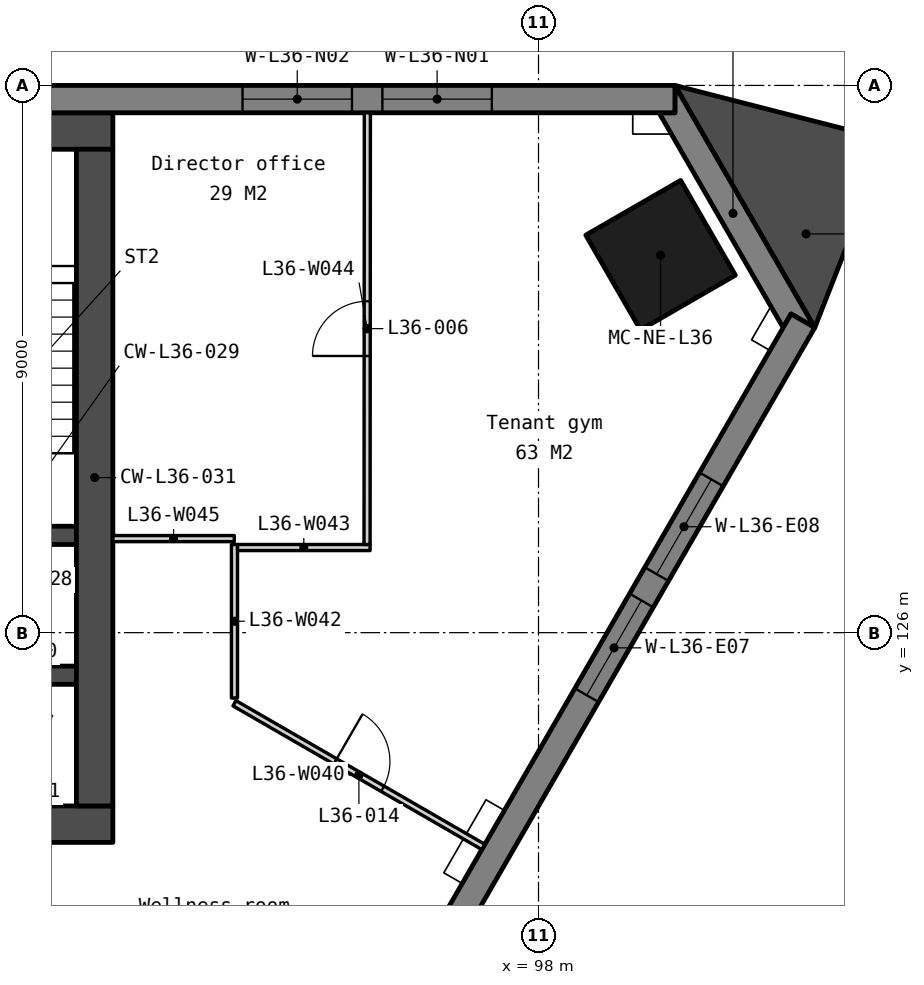
"""IFC4 building model, lengths in metres.
Left out: names, types, materials, properties, quantities, classifications, styles, units other than length and angle.
Written with IfcOpenShell. Run it as: python <this file> out.ifc"""

import sys

from ifc_helpers import new_model, si_unit, direction, frame, frame_2d, origin, origin_2d, place, context, subcontext, project, spatial, polyline, rectangle, outline, extrude, element, fill, save


model = new_model("IFC4")
c1 = context("Model", 3, precision=1e-05, world=origin(), true_north=direction((0.0, 1.0)))
c2 = subcontext(c1, "Body", "Model", "MODEL_VIEW")
j1 = project(units=[si_unit("LENGTHUNIT", "METRE"), si_unit("PLANEANGLEUNIT", "RADIAN")], contexts=[c1])
p1 = place(None, origin())
s1 = spatial("IfcSite", under=j1, at=p1, CompositionType="ELEMENT")
p2 = place(p1, origin())
s2 = spatial("IfcBuilding", under=s1, at=p2, CompositionType="ELEMENT")
p3 = place(p2, frame((0.0, 0.0, 144.2)))
s3 = spatial("IfcBuildingStorey", under=s2, at=p3, CompositionType="ELEMENT", Elevation=144.2)
p4 = place(p3, frame((100.007, 132.208, 0.0), z_axis=(0.0, 0.0, 1.0), x_axis=(-0.5, 0.866025403784, 0.0)))
e1 = element("IfcColumn", 1, at=p4, inside=s3, PredefinedType="COLUMN", context=c2, shape_type="SweptSolid", body=[
    extrude(rectangle(XDim=1.8, YDim=1.8, at=origin_2d()), origin(), (0.0, 0.0, 1.0), 3.9),
])
p5 = place(p3, frame((69.0, 134.25, 0.0), z_axis=(0.0, 0.0, 1.0), x_axis=(1.0, 0.0, 0.0)))
e2 = element("IfcWall", 2, at=p5, inside=s3, PredefinedType="SOLIDWALL", context=c2, shape_type="SweptSolid", body=[
    extrude(rectangle(XDim=22.0, YDim=0.6, at=frame_2d((11.0, 0.0))), origin(), (0.0, 0.0, 1.0), 3.75),
])
p6 = place(p3, frame((69.0, 122.85, 0.0), z_axis=(0.0, 0.0, 1.0), x_axis=(1.0, 0.0, 0.0)))
e3 = element("IfcWall", 3, at=p6, inside=s3, PredefinedType="SOLIDWALL", context=c2, shape_type="SweptSolid", body=[
    extrude(rectangle(XDim=22.0, YDim=0.6, at=frame_2d((11.0, 0.0))), origin(), (0.0, 0.0, 1.0), 3.75),
])
p7 = place(p6, frame((16.375, 0.0, 0.0)))
e4 = element("IfcOpeningElement", 4, at=p7, cuts=e3, PredefinedType="OPENING", context=c2, shape_type="SweptSolid", body=[
    extrude(rectangle(XDim=1.8, YDim=2.1, at=frame_2d((0.9, 1.05))), frame((0.0, 0.31, 0.0), z_axis=(0.0, -1.0, 0.0), x_axis=(1.0, 0.0, 0.0)), (0.0, 0.0, 1.0), 0.62),
])
p8 = place(p6, frame((3.825, 0.0, 0.0)))
e5 = element("IfcOpeningElement", 5, at=p8, cuts=e3, PredefinedType="OPENING", context=c2, shape_type="SweptSolid", body=[
    extrude(rectangle(XDim=1.8, YDim=2.1, at=frame_2d((0.9, 1.05))), frame((0.0, 0.31, 0.0), z_axis=(0.0, -1.0, 0.0), x_axis=(1.0, 0.0, 0.0)), (0.0, 0.0, 1.0), 0.62),
])
p9 = place(p6, frame((12.85, 0.0, 0.0)))
e6 = element("IfcOpeningElement", 6, at=p9, cuts=e3, PredefinedType="OPENING", context=c2, shape_type="SweptSolid", body=[
    extrude(rectangle(XDim=1.5, YDim=2.1, at=frame_2d((0.75, 1.05))), frame((0.0, 0.31, 0.0), z_axis=(0.0, -1.0, 0.0), x_axis=(1.0, 0.0, 0.0)), (0.0, 0.0, 1.0), 0.62),
])
for number, where, z_axis, x_axis in (
    (7, (87.85, 127.6, 0.0), (0.0, 0.0, 1.0), (1.0, 0.0, 0.0)),
    (8, (87.85, 125.3, 0.0), (0.0, 0.0, 1.0), (1.0, 0.0, 0.0)),
):
    element("IfcWall", number, at=place(p3, frame(where, z_axis=z_axis, x_axis=x_axis)), inside=s3, PredefinedType="SOLIDWALL", context=c2, shape_type="SweptSolid", body=[
        extrude(rectangle(XDim=2.55, YDim=0.3, at=frame_2d((1.275, 0.0))), origin(), (0.0, 0.0, 1.0), 3.75),
    ])
p10 = place(p3, frame((90.7, 133.95, 0.0), z_axis=(0.0, 0.0, 1.0), x_axis=(0.0, -1.0, 0.0)))
e9 = element("IfcWall", 9, at=p10, inside=s3, PredefinedType="SOLIDWALL", context=c2, shape_type="SweptSolid", body=[
    extrude(rectangle(XDim=10.8, YDim=0.6, at=frame_2d((5.4, 0.0))), origin(), (0.0, 0.0, 1.0), 3.75),
])
p11 = place(p3, frame((0.0, 0.0, -0.15)))
e10 = element("IfcWall", 10, at=p11, inside=s3, PredefinedType="SOLIDWALL", context=c2, shape_type="SweptSolid", body=[
    extrude(outline(polyline([(102.543, 131.016), (102.153, 131.241), (102.023, 131.016), (99.983, 134.55), (100.243, 134.55), (100.243, 135.0), (102.543, 131.016)])), origin(), (0.0, 0.0, 1.0), 3.9),
])
p12 = place(p3, frame((100.243, 134.775, -0.15), z_axis=(0.0, 0.0, 1.0), x_axis=(-1.0, 0.0, 0.0)))
e11 = element("IfcWall", 11, at=p12, inside=s3, PredefinedType="SOLIDWALL", context=c2, shape_type="SweptSolid", body=[
    extrude(outline(polyline([(0.0, 0.0), (0.0, 3.9), (33.425, 3.9), (33.425, 0.0), (0.0, 0.0)])), frame((0.0, 0.225, 0.0), z_axis=(0.0, -1.0, 0.0), x_axis=(1.0, 0.0, 0.0)), (0.0, 0.0, 1.0), 0.45),
])
p13 = place(p12, frame((3.011, 0.0, 0.95)))
e12 = element("IfcOpeningElement", 12, at=p13, cuts=e11, PredefinedType="OPENING", context=c2, shape_type="SweptSolid", body=[
    extrude(rectangle(XDim=1.8, YDim=2.2, at=frame_2d((0.9, 1.1))), frame((0.0, 0.235, 0.0), z_axis=(0.0, -1.0, 0.0), x_axis=(1.0, 0.0, 0.0)), (0.0, 0.0, 1.0), 0.47),
])
p14 = place(p12, frame((5.311, 0.0, 0.95)))
e13 = element("IfcOpeningElement", 13, at=p14, cuts=e11, PredefinedType="OPENING", context=c2, shape_type="SweptSolid", body=[
    extrude(rectangle(XDim=1.8, YDim=2.2, at=frame_2d((0.9, 1.1))), frame((0.0, 0.235, 0.0), z_axis=(0.0, -1.0, 0.0), x_axis=(1.0, 0.0, 0.0)), (0.0, 0.0, 1.0), 0.47),
])
p15 = place(p12, frame((13.132, 0.0, 0.95)))
e14 = element("IfcOpeningElement", 14, at=p15, cuts=e11, PredefinedType="OPENING", context=c2, shape_type="SweptSolid", body=[
    extrude(rectangle(XDim=1.8, YDim=2.2, at=frame_2d((0.9, 1.1))), frame((0.0, 0.235, 0.0), z_axis=(0.0, -1.0, 0.0), x_axis=(1.0, 0.0, 0.0)), (0.0, 0.0, 1.0), 0.47),
])
p16 = place(p12, frame((15.432, 0.0, 0.95)))
e15 = element("IfcOpeningElement", 15, at=p16, cuts=e11, PredefinedType="OPENING", context=c2, shape_type="SweptSolid", body=[
    extrude(rectangle(XDim=1.8, YDim=2.2, at=frame_2d((0.9, 1.1))), frame((0.0, 0.235, 0.0), z_axis=(0.0, -1.0, 0.0), x_axis=(1.0, 0.0, 0.0)), (0.0, 0.0, 1.0), 0.47),
])
p17 = place(p12, frame((23.254, 0.0, 0.95)))
e16 = element("IfcOpeningElement", 16, at=p17, cuts=e11, PredefinedType="OPENING", context=c2, shape_type="SweptSolid", body=[
    extrude(rectangle(XDim=1.8, YDim=2.2, at=frame_2d((0.9, 1.1))), frame((0.0, 0.235, 0.0), z_axis=(0.0, -1.0, 0.0), x_axis=(1.0, 0.0, 0.0)), (0.0, 0.0, 1.0), 0.47),
])
p18 = place(p12, frame((25.554, 0.0, 0.95)))
e17 = element("IfcOpeningElement", 17, at=p18, cuts=e11, PredefinedType="OPENING", context=c2, shape_type="SweptSolid", body=[
    extrude(rectangle(XDim=1.8, YDim=2.2, at=frame_2d((0.9, 1.1))), frame((0.0, 0.235, 0.0), z_axis=(0.0, -1.0, 0.0), x_axis=(1.0, 0.0, 0.0)), (0.0, 0.0, 1.0), 0.47),
])
p19 = place(p3, frame((82.105, 96.067, -0.15), z_axis=(0.0, 0.0, 1.0), x_axis=(0.499997369791, 0.866026922331, 0.0)))
e18 = element("IfcWall", 18, at=p19, inside=s3, PredefinedType="SOLIDWALL", context=c2, shape_type="SweptSolid", body=[
    extrude(outline(polyline([(40.486, 0.0), (40.486, 3.9), (0.0, 3.9), (0.0, 0.0), (40.486, 0.0)])), frame((0.0, 0.225, 0.0), z_axis=(0.0, -1.0, 0.0), x_axis=(1.0, 0.0, 0.0)), (0.0, 0.0, 1.0), 0.45),
])
p20 = place(p19, frame((3.011, 0.0, 0.95)))
e19 = element("IfcOpeningElement", 19, at=p20, cuts=e18, PredefinedType="OPENING", context=c2, shape_type="SweptSolid", body=[
    extrude(rectangle(XDim=1.8, YDim=2.2, at=frame_2d((0.9, 1.1))), frame((0.0, 0.235, 0.0), z_axis=(0.0, -1.0, 0.0), x_axis=(1.0, 0.0, 0.0)), (0.0, 0.0, 1.0), 0.47),
])
p21 = place(p19, frame((5.311, 0.0, 0.95)))
e20 = element("IfcOpeningElement", 20, at=p21, cuts=e18, PredefinedType="OPENING", context=c2, shape_type="SweptSolid", body=[
    extrude(rectangle(XDim=1.8, YDim=2.2, at=frame_2d((0.9, 1.1))), frame((0.0, 0.235, 0.0), z_axis=(0.0, -1.0, 0.0), x_axis=(1.0, 0.0, 0.0)), (0.0, 0.0, 1.0), 0.47),
])
p22 = place(p19, frame((13.132, 0.0, 0.95)))
e21 = element("IfcOpeningElement", 21, at=p22, cuts=e18, PredefinedType="OPENING", context=c2, shape_type="SweptSolid", body=[
    extrude(rectangle(XDim=1.8, YDim=2.2, at=frame_2d((0.9, 1.1))), frame((0.0, 0.235, 0.0), z_axis=(0.0, -1.0, 0.0), x_axis=(1.0, 0.0, 0.0)), (0.0, 0.0, 1.0), 0.47),
])
p23 = place(p19, frame((15.432, 0.0, 0.95)))
e22 = element("IfcOpeningElement", 22, at=p23, cuts=e18, PredefinedType="OPENING", context=c2, shape_type="SweptSolid", body=[
    extrude(rectangle(XDim=1.8, YDim=2.2, at=frame_2d((0.9, 1.1))), frame((0.0, 0.235, 0.0), z_axis=(0.0, -1.0, 0.0), x_axis=(1.0, 0.0, 0.0)), (0.0, 0.0, 1.0), 0.47),
])
p24 = place(p19, frame((23.254, 0.0, 0.95)))
e23 = element("IfcOpeningElement", 23, at=p24, cuts=e18, PredefinedType="OPENING", context=c2, shape_type="SweptSolid", body=[
    extrude(rectangle(XDim=1.8, YDim=2.2, at=frame_2d((0.9, 1.1))), frame((0.0, 0.235, 0.0), z_axis=(0.0, -1.0, 0.0), x_axis=(1.0, 0.0, 0.0)), (0.0, 0.0, 1.0), 0.47),
])
p25 = place(p19, frame((25.554, 0.0, 0.95)))
e24 = element("IfcOpeningElement", 24, at=p25, cuts=e18, PredefinedType="OPENING", context=c2, shape_type="SweptSolid", body=[
    extrude(rectangle(XDim=1.8, YDim=2.2, at=frame_2d((0.9, 1.1))), frame((0.0, 0.235, 0.0), z_axis=(0.0, -1.0, 0.0), x_axis=(1.0, 0.0, 0.0)), (0.0, 0.0, 1.0), 0.47),
])
p26 = place(p19, frame((33.375, 0.0, 0.95)))
e25 = element("IfcOpeningElement", 25, at=p26, cuts=e18, PredefinedType="OPENING", context=c2, shape_type="SweptSolid", body=[
    extrude(rectangle(XDim=1.8, YDim=2.2, at=frame_2d((0.9, 1.1))), frame((0.0, 0.235, 0.0), z_axis=(0.0, -1.0, 0.0), x_axis=(1.0, 0.0, 0.0)), (0.0, 0.0, 1.0), 0.47),
])
p27 = place(p19, frame((35.675, 0.0, 0.95)))
e26 = element("IfcOpeningElement", 26, at=p27, cuts=e18, PredefinedType="OPENING", context=c2, shape_type="SweptSolid", body=[
    extrude(rectangle(XDim=1.8, YDim=2.2, at=frame_2d((0.9, 1.1))), frame((0.0, 0.235, 0.0), z_axis=(0.0, -1.0, 0.0), x_axis=(1.0, 0.0, 0.0)), (0.0, 0.0, 1.0), 0.47),
])
p28 = place(p3, frame((0.0, 0.0, -0.15)))
e27 = element("IfcWall", 27, at=p28, inside=s3, PredefinedType="SOLIDWALL", context=c2, shape_type="SweptSolid", body=[
    extrude(outline(polyline([(102.543, 131.016), (103.752, 134.1), (100.243, 135.0), (102.543, 131.016)])), origin(), (0.0, 0.0, 1.0), 3.9),
])
p29 = place(p3, frame((93.0, 124.839, 0.0), z_axis=(0.0, 0.0, 1.0), x_axis=(0.866028145587, -0.499995251029, 0.0)))
e28 = element("IfcWall", 28, at=p29, inside=s3, PredefinedType="PARTITIONING", context=c2, shape_type="SweptSolid", body=[
    extrude(rectangle(XDim=4.726, YDim=0.1, at=frame_2d((2.363, 0.0))), origin(), (0.0, 0.0, 1.0), 3.75),
])
p30 = place(p29, frame((1.913, 0.0, 0.0)))
e29 = element("IfcOpeningElement", 29, at=p30, cuts=e28, PredefinedType="OPENING", context=c2, shape_type="SweptSolid", body=[
    extrude(rectangle(XDim=0.9, YDim=2.1, at=frame_2d((0.45, 1.05))), frame((0.0, 0.06, 0.0), z_axis=(0.0, -1.0, 0.0), x_axis=(1.0, 0.0, 0.0)), (0.0, 0.0, 1.0), 0.12),
])
p31 = place(p3, frame((93.0, 124.925, 0.0), z_axis=(0.0, 0.0, 1.0), x_axis=(0.0, 1.0, 0.0)))
e30 = element("IfcWall", 30, at=p31, inside=s3, PredefinedType="PARTITIONING", context=c2, shape_type="SweptSolid", body=[
    extrude(rectangle(XDim=2.525, YDim=0.1, at=frame_2d((1.262, 0.0))), origin(), (0.0, 0.0, 1.0), 3.75),
])
p32 = place(p3, frame((93.05, 127.4, 0.0), z_axis=(0.0, 0.0, 1.0), x_axis=(1.0, 0.0, 0.0)))
e31 = element("IfcWall", 31, at=p32, inside=s3, PredefinedType="PARTITIONING", context=c2, shape_type="SweptSolid", body=[
    extrude(rectangle(XDim=2.18, YDim=0.1, at=frame_2d((1.09, 0.0))), origin(), (0.0, 0.0, 1.0), 3.75),
])
p33 = place(p3, frame((95.18, 127.45, 0.0), z_axis=(0.0, 0.0, 1.0), x_axis=(0.000687710449, 0.999999763527, 0.0)))
e32 = element("IfcWall", 32, at=p33, inside=s3, PredefinedType="PARTITIONING", context=c2, shape_type="SweptSolid", body=[
    extrude(rectangle(XDim=7.1, YDim=0.1, at=frame_2d((3.55, 0.0))), origin(), (0.0, 0.0, 1.0), 3.75),
])
p34 = place(p33, frame((3.1, 0.0, 0.0)))
e33 = element("IfcOpeningElement", 33, at=p34, cuts=e32, PredefinedType="OPENING", context=c2, shape_type="SweptSolid", body=[
    extrude(rectangle(XDim=0.9, YDim=2.1, at=frame_2d((0.45, 1.05))), frame((0.0, 0.06, 0.0), z_axis=(0.0, -1.0, 0.0), x_axis=(1.0, 0.0, 0.0)), (0.0, 0.0, 1.0), 0.12),
])
p35 = place(p3, frame((91.0, 127.547, 0.0), z_axis=(0.0, 0.0, 1.0), x_axis=(1.0, 0.0, 0.0)))
e34 = element("IfcWall", 34, at=p35, inside=s3, PredefinedType="PARTITIONING", context=c2, shape_type="SweptSolid", body=[
    extrude(rectangle(XDim=1.997, YDim=0.1, at=frame_2d((0.999, 0.0))), origin(), (0.0, 0.0, 1.0), 3.75),
])
p36 = place(p13, origin())
e35 = element("IfcWindow", 35, at=p36, inside=s3, PartitioningType="SINGLE_PANEL", PredefinedType="WINDOW", context=c2, shape_type="SweptSolid", body=[
    extrude(rectangle(XDim=1.8, YDim=2.2, at=frame_2d((0.9, 1.1))), frame((0.0, 0.03, 0.0), z_axis=(0.0, -1.0, 0.0), x_axis=(1.0, 0.0, 0.0)), (0.0, 0.0, 1.0), 0.06),
])
fill(e12, e35)
p37 = place(p14, origin())
e36 = element("IfcWindow", 36, at=p37, inside=s3, PartitioningType="SINGLE_PANEL", PredefinedType="WINDOW", context=c2, shape_type="SweptSolid", body=[
    extrude(rectangle(XDim=1.8, YDim=2.2, at=frame_2d((0.9, 1.1))), frame((0.0, 0.03, 0.0), z_axis=(0.0, -1.0, 0.0), x_axis=(1.0, 0.0, 0.0)), (0.0, 0.0, 1.0), 0.06),
])
fill(e13, e36)
p38 = place(p26, origin())
e37 = element("IfcWindow", 37, at=p38, inside=s3, PartitioningType="SINGLE_PANEL", PredefinedType="WINDOW", context=c2, shape_type="SweptSolid", body=[
    extrude(rectangle(XDim=1.8, YDim=2.2, at=frame_2d((0.9, 1.1))), frame((0.0, 0.03, 0.0), z_axis=(0.0, -1.0, 0.0), x_axis=(1.0, 0.0, 0.0)), (0.0, 0.0, 1.0), 0.06),
])
fill(e25, e37)
p39 = place(p27, origin())
e38 = element("IfcWindow", 38, at=p39, inside=s3, PartitioningType="SINGLE_PANEL", PredefinedType="WINDOW", context=c2, shape_type="SweptSolid", body=[
    extrude(rectangle(XDim=1.8, YDim=2.2, at=frame_2d((0.9, 1.1))), frame((0.0, 0.03, 0.0), z_axis=(0.0, -1.0, 0.0), x_axis=(1.0, 0.0, 0.0)), (0.0, 0.0, 1.0), 0.06),
])
fill(e26, e38)
p40 = place(p34, origin())
e39 = element("IfcDoor", 39, at=p40, inside=s3, OperationType="SINGLE_SWING_LEFT", PredefinedType="DOOR", context=c2, shape_type="SweptSolid", body=[
    extrude(rectangle(XDim=0.9, YDim=2.1, at=frame_2d((0.45, 1.05))), frame((0.0, 0.025, 0.0), z_axis=(0.0, -1.0, 0.0), x_axis=(1.0, 0.0, 0.0)), (0.0, 0.0, 1.0), 0.05),
])
fill(e33, e39)
p41 = place(p30, origin())
e40 = element("IfcDoor", 40, at=p41, inside=s3, OperationType="SINGLE_SWING_LEFT", PredefinedType="DOOR", context=c2, shape_type="SweptSolid", body=[
    extrude(rectangle(XDim=0.9, YDim=2.1, at=frame_2d((0.45, 1.05))), frame((0.0, 0.025, 0.0), z_axis=(0.0, -1.0, 0.0), x_axis=(1.0, 0.0, 0.0)), (0.0, 0.0, 1.0), 0.05),
])
fill(e29, e40)
save(model, sys.argv[1])
